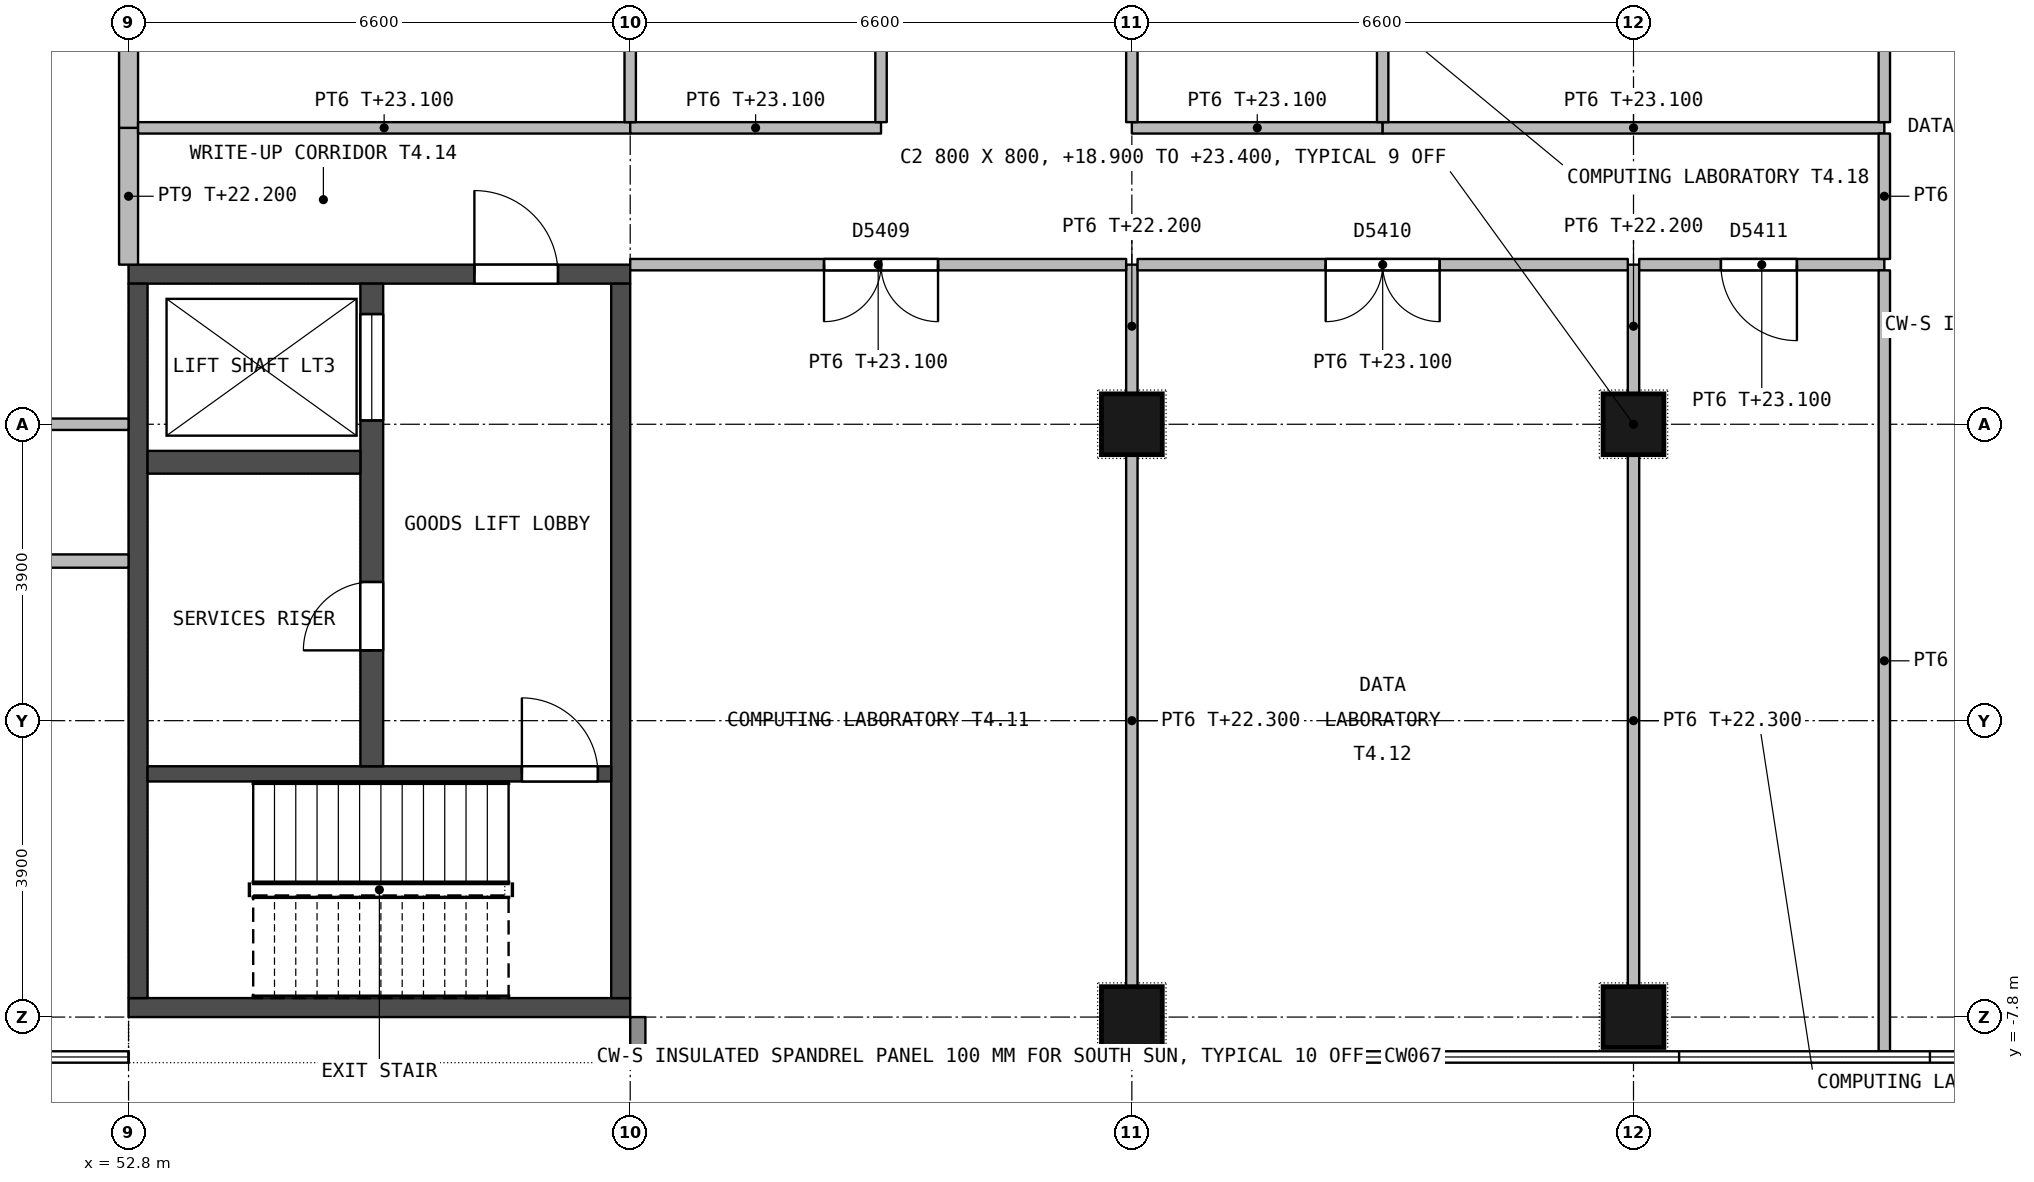
"""IFC4 building model, lengths in metres.
Left out: names, types, materials, properties, quantities, classifications, styles, units other than length and angle.
Written with IfcOpenShell. Run it as: python <this file> out.ifc"""

import sys

from ifc_helpers import new_model, si_unit, direction, frame, frame_2d, origin, origin_2d, place, context, subcontext, project, spatial, rectangle, extrude, element, fill, save


model = new_model("IFC4")
c1 = context("Model", 3, precision=1e-05, world=origin(), true_north=direction((0.0, 1.0)))
c2 = subcontext(c1, "Body", "Model", "MODEL_VIEW")
j1 = project(units=[si_unit("LENGTHUNIT", "METRE"), si_unit("PLANEANGLEUNIT", "RADIAN")], contexts=[c1])
p1 = place(None, origin())
s1 = spatial("IfcSite", under=j1, at=p1, CompositionType="ELEMENT")
p2 = place(p1, origin())
s2 = spatial("IfcBuilding", under=s1, at=p2, CompositionType="ELEMENT")
p3 = place(p2, frame((0.0, 0.0, 18.9)))
s3 = spatial("IfcBuildingStorey", under=s2, at=p3, CompositionType="ELEMENT", Elevation=18.9)
for number, where, z_axis, x_axis in (
    (1, (66.0, -7.8, 0.0), (0.0, 0.0, 1.0), (1.0, 0.0, 0.0)),
    (2, (66.0, 0.0, 0.0), (0.0, 0.0, 1.0), (1.0, 0.0, 0.0)),
    (3, (72.6, -7.8, 0.0), (0.0, 0.0, 1.0), (1.0, 0.0, 0.0)),
    (4, (72.6, 0.0, 0.0), (0.0, 0.0, 1.0), (1.0, 0.0, 0.0)),
):
    element("IfcColumn", number, at=place(p3, frame(where, z_axis=z_axis, x_axis=x_axis)), inside=s3, PredefinedType="COLUMN", context=c2, shape_type="SweptSolid", body=[
        extrude(rectangle(XDim=0.8, YDim=0.8, at=origin_2d()), origin(), (0.0, 0.0, 1.0), 4.5),
    ])
p4 = place(p3, frame((59.4, 1.975, 0.0), z_axis=(0.0, 0.0, 1.0), x_axis=(-1.0, 0.0, 0.0)))
e5 = element("IfcWall", 5, at=p4, inside=s3, PredefinedType="SHEAR", context=c2, shape_type="SweptSolid", body=[
    extrude(rectangle(XDim=6.6, YDim=0.25, at=frame_2d((3.3, 0.0))), origin(), (0.0, 0.0, 1.0), 4.2),
])
p5 = place(p4, frame((0.95, 0.0, 0.0)))
e6 = element("IfcOpeningElement", 6, at=p5, cuts=e5, PredefinedType="OPENING", context=c2, shape_type="SweptSolid", body=[
    extrude(rectangle(XDim=1.1, YDim=2.1, at=frame_2d((0.55, 1.05))), frame((0.0, 0.135, 0.0), z_axis=(0.0, -1.0, 0.0), x_axis=(1.0, 0.0, 0.0)), (0.0, 0.0, 1.0), 0.27),
])
p6 = place(p3, frame((59.4, -7.675, 0.0), z_axis=(0.0, 0.0, 1.0), x_axis=(-1.0, 0.0, 0.0)))
e7 = element("IfcWall", 7, at=p6, inside=s3, PredefinedType="SHEAR", context=c2, shape_type="SweptSolid", body=[
    extrude(rectangle(XDim=6.6, YDim=0.25, at=frame_2d((3.3, 0.0))), origin(), (0.0, 0.0, 1.0), 4.2),
])
for number, where, z_axis, x_axis in (
    (8, (59.275, 1.85, 0.0), (0.0, 0.0, 1.0), (0.0, -1.0, 0.0)),
    (9, (52.925, 1.85, 0.0), (0.0, 0.0, 1.0), (0.0, -1.0, 0.0)),
):
    element("IfcWall", number, at=place(p3, frame(where, z_axis=z_axis, x_axis=x_axis)), inside=s3, PredefinedType="SHEAR", context=c2, shape_type="SweptSolid", body=[
        extrude(rectangle(XDim=9.4, YDim=0.25, at=frame_2d((4.7, 0.0))), origin(), (0.0, 0.0, 1.0), 4.2),
    ])
p7 = place(p3, frame((59.15, -4.6, 0.0), z_axis=(0.0, 0.0, 1.0), x_axis=(-1.0, 0.0, 0.0)))
e10 = element("IfcWall", 10, at=p7, inside=s3, PredefinedType="SHEAR", context=c2, shape_type="SweptSolid", body=[
    extrude(rectangle(XDim=6.1, YDim=0.2, at=frame_2d((3.05, 0.0))), origin(), (0.0, 0.0, 1.0), 4.2),
])
p8 = place(p7, frame((0.175, 0.0, 0.0)))
e11 = element("IfcOpeningElement", 11, at=p8, cuts=e10, PredefinedType="OPENING", context=c2, shape_type="SweptSolid", body=[
    extrude(rectangle(XDim=1.0, YDim=2.1, at=frame_2d((0.5, 1.05))), frame((0.0, 0.11, 0.0), z_axis=(0.0, -1.0, 0.0), x_axis=(1.0, 0.0, 0.0)), (0.0, 0.0, 1.0), 0.22),
])
p9 = place(p3, frame((56.0, 1.85, 0.0), z_axis=(0.0, 0.0, 1.0), x_axis=(0.0, -1.0, 0.0)))
e12 = element("IfcWall", 12, at=p9, inside=s3, PredefinedType="SHEAR", context=c2, shape_type="SweptSolid", body=[
    extrude(rectangle(XDim=6.35, YDim=0.3, at=frame_2d((3.175, 0.0))), origin(), (0.0, 0.0, 1.0), 4.2),
])
p10 = place(p9, frame((3.925, 0.0, 0.0)))
e13 = element("IfcOpeningElement", 13, at=p10, cuts=e12, PredefinedType="OPENING", context=c2, shape_type="SweptSolid", body=[
    extrude(rectangle(XDim=0.9, YDim=2.1, at=frame_2d((0.45, 1.05))), frame((0.0, 0.16, 0.0), z_axis=(0.0, -1.0, 0.0), x_axis=(1.0, 0.0, 0.0)), (0.0, 0.0, 1.0), 0.32),
])
p11 = place(p9, frame((0.4, 0.0, 0.0)))
e14 = element("IfcOpeningElement", 14, at=p11, cuts=e12, PredefinedType="OPENING", context=c2, shape_type="SweptSolid", body=[
    extrude(rectangle(XDim=1.4, YDim=2.4, at=frame_2d((0.7, 1.2))), frame((0.0, 0.16, 0.0), z_axis=(0.0, -1.0, 0.0), x_axis=(1.0, 0.0, 0.0)), (0.0, 0.0, 1.0), 0.32),
])
p12 = place(p3, frame((55.85, -0.5, 0.0), z_axis=(0.0, 0.0, 1.0), x_axis=(-1.0, 0.0, 0.0)))
e15 = element("IfcWall", 15, at=p12, inside=s3, PredefinedType="SHEAR", context=c2, shape_type="SweptSolid", body=[
    extrude(rectangle(XDim=2.8, YDim=0.3, at=frame_2d((1.4, 0.0))), origin(), (0.0, 0.0, 1.0), 4.2),
])
p13 = place(p3, frame((59.5, -7.8, 0.0), z_axis=(0.0, 0.0, 1.0), x_axis=(0.0, -1.0, 0.0)))
e16 = element("IfcWall", 16, at=p13, inside=s3, PredefinedType="STANDARD", context=c2, shape_type="SweptSolid", body=[
    extrude(rectangle(XDim=0.6, YDim=0.2, at=frame_2d((0.3, 0.0))), origin(), (0.0, 0.0, 1.0), 3.5),
])
p14 = place(p3, frame((52.8, -1.8, 0.0), z_axis=(0.0, 0.0, 1.0), x_axis=(-1.0, 0.0, 0.0)))
e17 = element("IfcWall", 17, at=p14, inside=s3, PredefinedType="PARTITIONING", context=c2, shape_type="SweptSolid", body=[
    extrude(rectangle(XDim=6.512, YDim=0.175, at=frame_2d((3.256, 0.0))), origin(), (0.0, 0.0, 1.0), 4.2),
])
p15 = place(p14, frame((2.6, 0.0, 0.0)))
e18 = element("IfcOpeningElement", 18, at=p15, cuts=e17, PredefinedType="OPENING", context=c2, shape_type="SweptSolid", body=[
    extrude(rectangle(XDim=1.4, YDim=2.1, at=frame_2d((0.7, 1.05))), frame((0.0, 0.097, 0.0), z_axis=(0.0, -1.0, 0.0), x_axis=(1.0, 0.0, 0.0)), (0.0, 0.0, 1.0), 0.195),
])
p16 = place(p3, frame((52.8, 0.0, 0.0), z_axis=(0.0, 0.0, 1.0), x_axis=(-1.0, 0.0, 0.0)))
e19 = element("IfcWall", 19, at=p16, inside=s3, PredefinedType="PARTITIONING", context=c2, shape_type="SweptSolid", body=[
    extrude(rectangle(XDim=6.25, YDim=0.15, at=frame_2d((3.125, 0.0))), origin(), (0.0, 0.0, 1.0), 3.5),
])
p17 = place(p3, frame((52.8, 2.1, 0.0), z_axis=(0.0, 0.0, 1.0), x_axis=(0.0, 1.0, 0.0)))
e20 = element("IfcWall", 20, at=p17, inside=s3, PredefinedType="PARTITIONING", context=c2, shape_type="SweptSolid", body=[
    extrude(rectangle(XDim=1.8, YDim=0.25, at=frame_2d((0.9, 0.0))), origin(), (0.0, 0.0, 1.0), 3.3),
])
p18 = place(p3, frame((52.8, 3.9, 0.0), z_axis=(0.0, 0.0, 1.0), x_axis=(0.0, 1.0, 0.0)))
e21 = element("IfcWall", 21, at=p18, inside=s3, PredefinedType="PARTITIONING", context=c2, shape_type="SweptSolid", body=[
    extrude(rectangle(XDim=5.6, YDim=0.25, at=frame_2d((2.8, 0.0))), origin(), (0.0, 0.0, 1.0), 3.3),
])
p19 = place(p3, frame((66.0, -7.4, 0.0), z_axis=(0.0, 0.0, 1.0), x_axis=(0.0, 1.0, 0.0)))
e22 = element("IfcWall", 22, at=p19, inside=s3, PredefinedType="PARTITIONING", context=c2, shape_type="SweptSolid", body=[
    extrude(rectangle(XDim=7.0, YDim=0.15, at=frame_2d((3.5, 0.0))), origin(), (0.0, 0.0, 1.0), 3.4),
])
p20 = place(p3, frame((66.0, 0.4, 0.0), z_axis=(0.0, 0.0, 1.0), x_axis=(0.0, 1.0, 0.0)))
e23 = element("IfcWall", 23, at=p20, inside=s3, PredefinedType="PARTITIONING", context=c2, shape_type="SweptSolid", body=[
    extrude(rectangle(XDim=1.7, YDim=0.15, at=frame_2d((0.85, 0.0))), origin(), (0.0, 0.0, 1.0), 3.3),
])
p21 = place(p3, frame((65.925, 2.1, 0.0), z_axis=(0.0, 0.0, 1.0), x_axis=(-1.0, 0.0, 0.0)))
e24 = element("IfcWall", 24, at=p21, inside=s3, PredefinedType="PARTITIONING", context=c2, shape_type="SweptSolid", body=[
    extrude(rectangle(XDim=6.525, YDim=0.15, at=frame_2d((3.262, 0.0))), origin(), (0.0, 0.0, 1.0), 4.2),
])
p22 = place(p21, frame((2.475, 0.0, 0.0)))
e25 = element("IfcOpeningElement", 25, at=p22, cuts=e24, PredefinedType="OPENING", context=c2, shape_type="SweptSolid", body=[
    extrude(rectangle(XDim=1.5, YDim=2.1, at=frame_2d((0.75, 1.05))), frame((0.0, 0.085, 0.0), z_axis=(0.0, -1.0, 0.0), x_axis=(1.0, 0.0, 0.0)), (0.0, 0.0, 1.0), 0.17),
])
p23 = place(p3, frame((72.6, -7.4, 0.0), z_axis=(0.0, 0.0, 1.0), x_axis=(0.0, 1.0, 0.0)))
e26 = element("IfcWall", 26, at=p23, inside=s3, PredefinedType="PARTITIONING", context=c2, shape_type="SweptSolid", body=[
    extrude(rectangle(XDim=7.0, YDim=0.15, at=frame_2d((3.5, 0.0))), origin(), (0.0, 0.0, 1.0), 3.4),
])
p24 = place(p3, frame((72.6, 0.4, 0.0), z_axis=(0.0, 0.0, 1.0), x_axis=(0.0, 1.0, 0.0)))
e27 = element("IfcWall", 27, at=p24, inside=s3, PredefinedType="PARTITIONING", context=c2, shape_type="SweptSolid", body=[
    extrude(rectangle(XDim=1.7, YDim=0.15, at=frame_2d((0.85, 0.0))), origin(), (0.0, 0.0, 1.0), 3.3),
])
p25 = place(p3, frame((72.525, 2.1, 0.0), z_axis=(0.0, 0.0, 1.0), x_axis=(-1.0, 0.0, 0.0)))
e28 = element("IfcWall", 28, at=p25, inside=s3, PredefinedType="PARTITIONING", context=c2, shape_type="SweptSolid", body=[
    extrude(rectangle(XDim=6.45, YDim=0.15, at=frame_2d((3.225, 0.0))), origin(), (0.0, 0.0, 1.0), 4.2),
])
p26 = place(p25, frame((2.475, 0.0, 0.0)))
e29 = element("IfcOpeningElement", 29, at=p26, cuts=e28, PredefinedType="OPENING", context=c2, shape_type="SweptSolid", body=[
    extrude(rectangle(XDim=1.5, YDim=2.1, at=frame_2d((0.75, 1.05))), frame((0.0, 0.085, 0.0), z_axis=(0.0, -1.0, 0.0), x_axis=(1.0, 0.0, 0.0)), (0.0, 0.0, 1.0), 0.17),
])
p27 = place(p3, frame((75.9, 2.1, 0.0), z_axis=(0.0, 0.0, 1.0), x_axis=(-1.0, 0.0, 0.0)))
e30 = element("IfcWall", 30, at=p27, inside=s3, PredefinedType="PARTITIONING", context=c2, shape_type="SweptSolid", body=[
    extrude(rectangle(XDim=3.225, YDim=0.15, at=frame_2d((1.612, 0.0))), origin(), (0.0, 0.0, 1.0), 4.2),
])
p28 = place(p27, frame((1.15, 0.0, 0.0)))
e31 = element("IfcOpeningElement", 31, at=p28, cuts=e30, PredefinedType="OPENING", context=c2, shape_type="SweptSolid", body=[
    extrude(rectangle(XDim=1.0, YDim=2.1, at=frame_2d((0.5, 1.05))), frame((0.0, 0.085, 0.0), z_axis=(0.0, -1.0, 0.0), x_axis=(1.0, 0.0, 0.0)), (0.0, 0.0, 1.0), 0.17),
])
p29 = place(p3, frame((75.9, -8.25, 0.0), z_axis=(0.0, 0.0, 1.0), x_axis=(0.0, 1.0, 0.0)))
e32 = element("IfcWall", 32, at=p29, inside=s3, PredefinedType="PARTITIONING", context=c2, shape_type="SweptSolid", body=[
    extrude(rectangle(XDim=10.275, YDim=0.15, at=frame_2d((5.137, 0.0))), origin(), (0.0, 0.0, 1.0), 4.2),
])
p30 = place(p3, frame((59.4, 3.9, 0.0), z_axis=(0.0, 0.0, 1.0), x_axis=(-1.0, 0.0, 0.0)))
e33 = element("IfcWall", 33, at=p30, inside=s3, PredefinedType="PARTITIONING", context=c2, shape_type="SweptSolid", body=[
    extrude(rectangle(XDim=6.475, YDim=0.15, at=frame_2d((3.237, 0.0))), origin(), (0.0, 0.0, 1.0), 4.2),
])
for number, where, z_axis, x_axis in (
    (34, (62.7, 3.9, 0.0), (0.0, 0.0, 1.0), (-1.0, 0.0, 0.0)),
    (35, (69.3, 3.9, 0.0), (0.0, 0.0, 1.0), (-1.0, 0.0, 0.0)),
):
    element("IfcWall", number, at=place(p3, frame(where, z_axis=z_axis, x_axis=x_axis)), inside=s3, PredefinedType="PARTITIONING", context=c2, shape_type="SweptSolid", body=[
        extrude(rectangle(XDim=3.3, YDim=0.15, at=frame_2d((1.65, 0.0))), origin(), (0.0, 0.0, 1.0), 4.2),
    ])
p31 = place(p3, frame((75.9, 3.9, 0.0), z_axis=(0.0, 0.0, 1.0), x_axis=(-1.0, 0.0, 0.0)))
e36 = element("IfcWall", 36, at=p31, inside=s3, PredefinedType="PARTITIONING", context=c2, shape_type="SweptSolid", body=[
    extrude(rectangle(XDim=6.6, YDim=0.15, at=frame_2d((3.3, 0.0))), origin(), (0.0, 0.0, 1.0), 4.2),
])
p32 = place(p3, frame((75.9, 2.175, 0.0), z_axis=(0.0, 0.0, 1.0), x_axis=(0.0, 1.0, 0.0)))
e37 = element("IfcWall", 37, at=p32, inside=s3, PredefinedType="PARTITIONING", context=c2, shape_type="SweptSolid", body=[
    extrude(rectangle(XDim=1.65, YDim=0.15, at=frame_2d((0.825, 0.0))), origin(), (0.0, 0.0, 1.0), 4.2),
])
p33 = place(p3, frame((59.4, 3.975, 0.0), z_axis=(0.0, 0.0, 1.0), x_axis=(0.0, 1.0, 0.0)))
e38 = element("IfcWall", 38, at=p33, inside=s3, PredefinedType="PARTITIONING", context=c2, shape_type="SweptSolid", body=[
    extrude(rectangle(XDim=5.525, YDim=0.15, at=frame_2d((2.762, 0.0))), origin(), (0.0, 0.0, 1.0), 3.3),
])
p34 = place(p3, frame((62.7, 9.825, 0.0), z_axis=(0.0, 0.0, 1.0), x_axis=(0.0, -1.0, 0.0)))
e39 = element("IfcWall", 39, at=p34, inside=s3, PredefinedType="PARTITIONING", context=c2, shape_type="SweptSolid", body=[
    extrude(rectangle(XDim=5.85, YDim=0.15, at=frame_2d((2.925, 0.0))), origin(), (0.0, 0.0, 1.0), 4.2),
])
p35 = place(p34, frame((2.425, 0.0, 0.0)))
e40 = element("IfcOpeningElement", 40, at=p35, cuts=e39, PredefinedType="OPENING", context=c2, shape_type="SweptSolid", body=[
    extrude(rectangle(XDim=1.0, YDim=2.1, at=frame_2d((0.5, 1.05))), frame((0.0, 0.085, 0.0), z_axis=(0.0, -1.0, 0.0), x_axis=(1.0, 0.0, 0.0)), (0.0, 0.0, 1.0), 0.17),
])
p36 = place(p3, frame((66.0, 3.975, 0.0), z_axis=(0.0, 0.0, 1.0), x_axis=(0.0, 1.0, 0.0)))
e41 = element("IfcWall", 41, at=p36, inside=s3, PredefinedType="PARTITIONING", context=c2, shape_type="SweptSolid", body=[
    extrude(rectangle(XDim=5.525, YDim=0.15, at=frame_2d((2.762, 0.0))), origin(), (0.0, 0.0, 1.0), 3.3),
])
p37 = place(p36, frame((2.425, 0.0, 0.0)))
e42 = element("IfcOpeningElement", 42, at=p37, cuts=e41, PredefinedType="OPENING", context=c2, shape_type="SweptSolid", body=[
    extrude(rectangle(XDim=1.0, YDim=2.1, at=frame_2d((0.5, 1.05))), frame((0.0, 0.085, 0.0), z_axis=(0.0, -1.0, 0.0), x_axis=(1.0, 0.0, 0.0)), (0.0, 0.0, 1.0), 0.17),
])
for number, where, z_axis, x_axis in (
    (43, (69.3, 3.975, 0.0), (0.0, 0.0, 1.0), (0.0, 1.0, 0.0)),
    (44, (75.9, 3.975, 0.0), (0.0, 0.0, 1.0), (0.0, 1.0, 0.0)),
):
    element("IfcWall", number, at=place(p3, frame(where, z_axis=z_axis, x_axis=x_axis)), inside=s3, PredefinedType="PARTITIONING", context=c2, shape_type="SweptSolid", body=[
        extrude(rectangle(XDim=5.85, YDim=0.15, at=frame_2d((2.925, 0.0))), origin(), (0.0, 0.0, 1.0), 4.2),
    ])
p38 = place(p10, origin())
e45 = element("IfcDoor", 45, at=p38, inside=s3, OperationType="SINGLE_SWING_RIGHT", PredefinedType="DOOR", context=c2, shape_type="SweptSolid", body=[
    extrude(rectangle(XDim=0.9, YDim=2.1, at=frame_2d((0.45, 1.05))), frame((0.0, 0.025, 0.0), z_axis=(0.0, -1.0, 0.0), x_axis=(1.0, 0.0, 0.0)), (0.0, 0.0, 1.0), 0.05),
])
fill(e13, e45)
p39 = place(p5, origin())
e46 = element("IfcDoor", 46, at=p39, inside=s3, OperationType="SINGLE_SWING_RIGHT", PredefinedType="DOOR", context=c2, shape_type="SweptSolid", body=[
    extrude(rectangle(XDim=1.1, YDim=2.1, at=frame_2d((0.55, 1.05))), frame((0.0, 0.025, 0.0), z_axis=(0.0, -1.0, 0.0), x_axis=(1.0, 0.0, 0.0)), (0.0, 0.0, 1.0), 0.05),
])
fill(e6, e46)
p40 = place(p8, origin())
e47 = element("IfcDoor", 47, at=p40, inside=s3, OperationType="SINGLE_SWING_RIGHT", PredefinedType="DOOR", context=c2, shape_type="SweptSolid", body=[
    extrude(rectangle(XDim=1.0, YDim=2.1, at=frame_2d((0.5, 1.05))), frame((0.0, 0.025, 0.0), z_axis=(0.0, -1.0, 0.0), x_axis=(1.0, 0.0, 0.0)), (0.0, 0.0, 1.0), 0.05),
])
fill(e11, e47)
p41 = place(p11, origin())
e48 = element("IfcDoor", 48, at=p41, inside=s3, OperationType="DOUBLE_DOOR_SLIDING", PredefinedType="NOTDEFINED", context=c2, shape_type="SweptSolid", body=[
    extrude(rectangle(XDim=1.4, YDim=2.4, at=frame_2d((0.7, 1.2))), frame((0.0, 0.025, 0.0), z_axis=(0.0, -1.0, 0.0), x_axis=(1.0, 0.0, 0.0)), (0.0, 0.0, 1.0), 0.05),
])
fill(e14, e48)
p42 = place(p22, origin())
e49 = element("IfcDoor", 49, at=p42, inside=s3, OperationType="DOUBLE_DOOR_SINGLE_SWING", PredefinedType="DOOR", context=c2, shape_type="SweptSolid", body=[
    extrude(rectangle(XDim=1.5, YDim=2.1, at=frame_2d((0.75, 1.05))), frame((0.0, 0.027, 0.0), z_axis=(0.0, -1.0, 0.0), x_axis=(1.0, 0.0, 0.0)), (0.0, 0.0, 1.0), 0.054),
])
fill(e25, e49)
p43 = place(p26, origin())
e50 = element("IfcDoor", 50, at=p43, inside=s3, OperationType="DOUBLE_DOOR_SINGLE_SWING", PredefinedType="DOOR", context=c2, shape_type="SweptSolid", body=[
    extrude(rectangle(XDim=1.5, YDim=2.1, at=frame_2d((0.75, 1.05))), frame((0.0, 0.027, 0.0), z_axis=(0.0, -1.0, 0.0), x_axis=(1.0, 0.0, 0.0)), (0.0, 0.0, 1.0), 0.054),
])
fill(e29, e50)
p44 = place(p28, origin())
e51 = element("IfcDoor", 51, at=p44, inside=s3, OperationType="SINGLE_SWING_LEFT", PredefinedType="DOOR", context=c2, shape_type="SweptSolid", body=[
    extrude(rectangle(XDim=1.0, YDim=2.1, at=frame_2d((0.5, 1.05))), frame((0.0, 0.027, 0.0), z_axis=(0.0, -1.0, 0.0), x_axis=(1.0, 0.0, 0.0)), (0.0, 0.0, 1.0), 0.054),
])
fill(e31, e51)
save(model, sys.argv[1])
